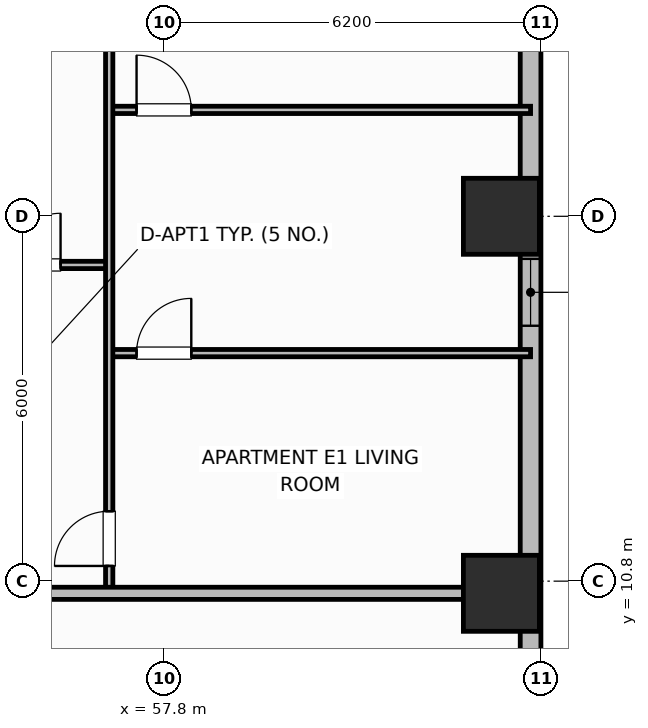
"""IFC4 building model, lengths in metres.
Left out: names, types, materials, properties, quantities, classifications, styles, units other than length and angle.
Written with IfcOpenShell. Run it as: python <this file> out.ifc"""

import sys

from ifc_helpers import new_model, si_unit, direction, frame, frame_2d, origin, origin_2d, place, context, subcontext, project, spatial, rectangle, extrude, element, fill, save


model = new_model("IFC4")
c1 = context("Model", 3, precision=1e-05, world=origin(), true_north=direction((0.0, 1.0)))
c2 = subcontext(c1, "Body", "Model", "MODEL_VIEW")
j1 = project(units=[si_unit("LENGTHUNIT", "METRE"), si_unit("PLANEANGLEUNIT", "RADIAN")], contexts=[c1])
p1 = place(None, origin())
s1 = spatial("IfcSite", under=j1, at=p1, CompositionType="ELEMENT")
p2 = place(p1, origin())
s2 = spatial("IfcBuilding", under=s1, at=p2, CompositionType="ELEMENT")
p3 = place(p2, frame((0.0, 0.0, 43.6)))
s3 = spatial("IfcBuildingStorey", under=s2, at=p3, CompositionType="ELEMENT", Elevation=43.6)
for number, where, z_axis, x_axis in (
    (1, (63.35, 10.6, 0.0), (0.0, 0.0, 1.0), (1.0, 0.0, 0.0)),
    (2, (63.35, 16.8, 0.0), (0.0, 0.0, 1.0), (1.0, 0.0, 0.0)),
):
    element("IfcColumn", number, at=place(p3, frame(where, z_axis=z_axis, x_axis=x_axis)), inside=s3, PredefinedType="COLUMN", context=c2, shape_type="SweptSolid", body=[
        extrude(rectangle(XDim=1.25, YDim=1.25, at=origin_2d()), origin(), (0.0, 0.0, 1.0), 3.7),
    ])
p4 = place(p3, frame((63.83, 9.0, 0.0), z_axis=(0.0, 0.0, 1.0), x_axis=(0.0, 1.0, 0.0)))
e3 = element("IfcWall", 3, at=p4, inside=s3, PredefinedType="SOLIDWALL", context=c2, shape_type="SweptSolid", body=[
    extrude(rectangle(XDim=14.8, YDim=0.34, at=frame_2d((7.4, 0.0))), origin(), (0.0, 0.0, 1.0), 2.7),
])
p5 = place(p4, frame((6.0, 0.0, 0.89)))
e4 = element("IfcOpeningElement", 4, at=p5, cuts=e3, PredefinedType="OPENING", context=c2, shape_type="SweptSolid", body=[
    extrude(rectangle(XDim=1.1, YDim=1.65, at=frame_2d((0.55, 0.825))), frame((0.0, 0.18, 0.0), z_axis=(0.0, -1.0, 0.0), x_axis=(1.0, 0.0, 0.0)), (0.0, 0.0, 1.0), 0.36),
])
p6 = place(p4, frame((11.312, 0.0, 0.68)))
e5 = element("IfcOpeningElement", 5, at=p6, cuts=e3, PredefinedType="OPENING", context=c2, shape_type="SweptSolid", body=[
    extrude(rectangle(XDim=1.6, YDim=1.9, at=frame_2d((0.8, 0.95))), frame((0.0, 0.18, 0.0), z_axis=(0.0, -1.0, 0.0), x_axis=(1.0, 0.0, 0.0)), (0.0, 0.0, 1.0), 0.36),
])
p7 = place(p3, frame((54.65, 16.0, 0.0), z_axis=(0.0, 0.0, 1.0), x_axis=(1.0, 0.0, 0.0)))
e6 = element("IfcWall", 6, at=p7, inside=s3, PredefinedType="PARTITIONING", context=c2, shape_type="SweptSolid", body=[
    extrude(rectangle(XDim=2.25, YDim=0.12, at=frame_2d((1.125, 0.0))), origin(), (0.0, 0.0, 1.0), 2.53),
])
p8 = place(p7, frame((0.6, 0.0, 0.0)))
e7 = element("IfcOpeningElement", 7, at=p8, cuts=e6, PredefinedType="OPENING", context=c2, shape_type="SweptSolid", body=[
    extrude(rectangle(XDim=0.85, YDim=2.1, at=frame_2d((0.425, 1.05))), frame((0.0, 0.07, 0.0), z_axis=(0.0, -1.0, 0.0), x_axis=(1.0, 0.0, 0.0)), (0.0, 0.0, 1.0), 0.14),
])
p9 = place(p3, frame((56.9, 14.55, 0.0), z_axis=(0.0, 0.0, 1.0), x_axis=(1.0, 0.0, 0.0)))
e8 = element("IfcWall", 8, at=p9, inside=s3, PredefinedType="PARTITIONING", context=c2, shape_type="SweptSolid", body=[
    extrude(rectangle(XDim=6.93, YDim=0.12, at=frame_2d((3.465, 0.0))), origin(), (0.0, 0.0, 1.0), 2.53),
])
p10 = place(p9, frame((0.45, 0.0, 0.0)))
e9 = element("IfcOpeningElement", 9, at=p10, cuts=e8, PredefinedType="OPENING", context=c2, shape_type="SweptSolid", body=[
    extrude(rectangle(XDim=0.9, YDim=2.1, at=frame_2d((0.45, 1.05))), frame((0.0, 0.07, 0.0), z_axis=(0.0, -1.0, 0.0), x_axis=(1.0, 0.0, 0.0)), (0.0, 0.0, 1.0), 0.14),
])
p11 = place(p3, frame((56.9, 18.55, 0.0), z_axis=(0.0, 0.0, 1.0), x_axis=(1.0, 0.0, 0.0)))
e10 = element("IfcWall", 10, at=p11, inside=s3, PredefinedType="PARTITIONING", context=c2, shape_type="SweptSolid", body=[
    extrude(rectangle(XDim=6.93, YDim=0.12, at=frame_2d((3.465, 0.0))), origin(), (0.0, 0.0, 1.0), 2.53),
])
p12 = place(p11, frame((0.45, 0.0, 0.0)))
e11 = element("IfcOpeningElement", 11, at=p12, cuts=e10, PredefinedType="OPENING", context=c2, shape_type="SweptSolid", body=[
    extrude(rectangle(XDim=0.9, YDim=2.1, at=frame_2d((0.45, 1.05))), frame((0.0, 0.07, 0.0), z_axis=(0.0, -1.0, 0.0), x_axis=(1.0, 0.0, 0.0)), (0.0, 0.0, 1.0), 0.14),
])
p13 = place(p3, frame((56.9, 10.64, 0.0), z_axis=(0.0, 0.0, 1.0), x_axis=(0.0, 1.0, 0.0)))
e12 = element("IfcWall", 12, at=p13, inside=s3, PredefinedType="PARTITIONING", context=c2, shape_type="SweptSolid", body=[
    extrude(rectangle(XDim=15.92, YDim=0.12, at=frame_2d((7.96, 0.0))), origin(), (0.0, 0.0, 1.0), 2.53),
])
p14 = place(p13, frame((0.41, 0.0, 0.0)))
e13 = element("IfcOpeningElement", 13, at=p14, cuts=e12, PredefinedType="OPENING", context=c2, shape_type="SweptSolid", body=[
    extrude(rectangle(XDim=0.9, YDim=2.1, at=frame_2d((0.45, 1.05))), frame((0.0, 0.07, 0.0), z_axis=(0.0, -1.0, 0.0), x_axis=(1.0, 0.0, 0.0)), (0.0, 0.0, 1.0), 0.14),
])
p15 = place(p13, frame((13.125, 0.0, 0.0)))
e14 = element("IfcOpeningElement", 14, at=p15, cuts=e12, PredefinedType="OPENING", context=c2, shape_type="SweptSolid", body=[
    extrude(rectangle(XDim=0.82, YDim=2.08, at=frame_2d((0.41, 1.04))), frame((0.0, 0.07, 0.0), z_axis=(0.0, -1.0, 0.0), x_axis=(1.0, 0.0, 0.0)), (0.0, 0.0, 1.0), 0.14),
])
p16 = place(p3, frame((54.65, 10.6, 0.0), z_axis=(0.0, 0.0, 1.0), x_axis=(1.0, 0.0, 0.0)))
e15 = element("IfcWall", 15, at=p16, inside=s3, PredefinedType="PARTITIONING", context=c2, shape_type="SweptSolid", body=[
    extrude(rectangle(XDim=8.76, YDim=0.2, at=frame_2d((4.38, 0.0))), origin(), (0.0, 0.0, 1.0), 2.53),
])
p17 = place(p5, origin())
e16 = element("IfcWindow", 16, at=p17, inside=s3, PartitioningType="SINGLE_PANEL", PredefinedType="WINDOW", context=c2, shape_type="SweptSolid", body=[
    extrude(rectangle(XDim=1.1, YDim=1.65, at=frame_2d((0.55, 0.825))), frame((0.0, 0.03, 0.0), z_axis=(0.0, -1.0, 0.0), x_axis=(1.0, 0.0, 0.0)), (0.0, 0.0, 1.0), 0.06),
])
fill(e4, e16)
p18 = place(p8, origin())
e17 = element("IfcDoor", 17, at=p18, inside=s3, OperationType="SINGLE_SWING_RIGHT", PredefinedType="DOOR", context=c2, shape_type="SweptSolid", body=[
    extrude(rectangle(XDim=0.85, YDim=2.1, at=frame_2d((0.425, 1.05))), frame((0.0, 0.025, 0.0), z_axis=(0.0, -1.0, 0.0), x_axis=(1.0, 0.0, 0.0)), (0.0, 0.0, 1.0), 0.05),
])
fill(e7, e17)
p19 = place(p10, origin())
e18 = element("IfcDoor", 18, at=p19, inside=s3, OperationType="SINGLE_SWING_RIGHT", PredefinedType="DOOR", context=c2, shape_type="SweptSolid", body=[
    extrude(rectangle(XDim=0.9, YDim=2.1, at=frame_2d((0.45, 1.05))), frame((0.0, 0.025, 0.0), z_axis=(0.0, -1.0, 0.0), x_axis=(1.0, 0.0, 0.0)), (0.0, 0.0, 1.0), 0.05),
])
fill(e9, e18)
p20 = place(p12, origin())
e19 = element("IfcDoor", 19, at=p20, inside=s3, OperationType="SINGLE_SWING_LEFT", PredefinedType="DOOR", context=c2, shape_type="SweptSolid", body=[
    extrude(rectangle(XDim=0.9, YDim=2.1, at=frame_2d((0.45, 1.05))), frame((0.0, 0.025, 0.0), z_axis=(0.0, -1.0, 0.0), x_axis=(1.0, 0.0, 0.0)), (0.0, 0.0, 1.0), 0.05),
])
fill(e11, e19)
p21 = place(p14, origin())
e20 = element("IfcDoor", 20, at=p21, inside=s3, OperationType="SINGLE_SWING_LEFT", PredefinedType="DOOR", context=c2, shape_type="SweptSolid", body=[
    extrude(rectangle(XDim=0.9, YDim=2.1, at=frame_2d((0.45, 1.05))), frame((0.0, 0.025, 0.0), z_axis=(0.0, -1.0, 0.0), x_axis=(1.0, 0.0, 0.0)), (0.0, 0.0, 1.0), 0.05),
])
fill(e13, e20)
save(model, sys.argv[1])
